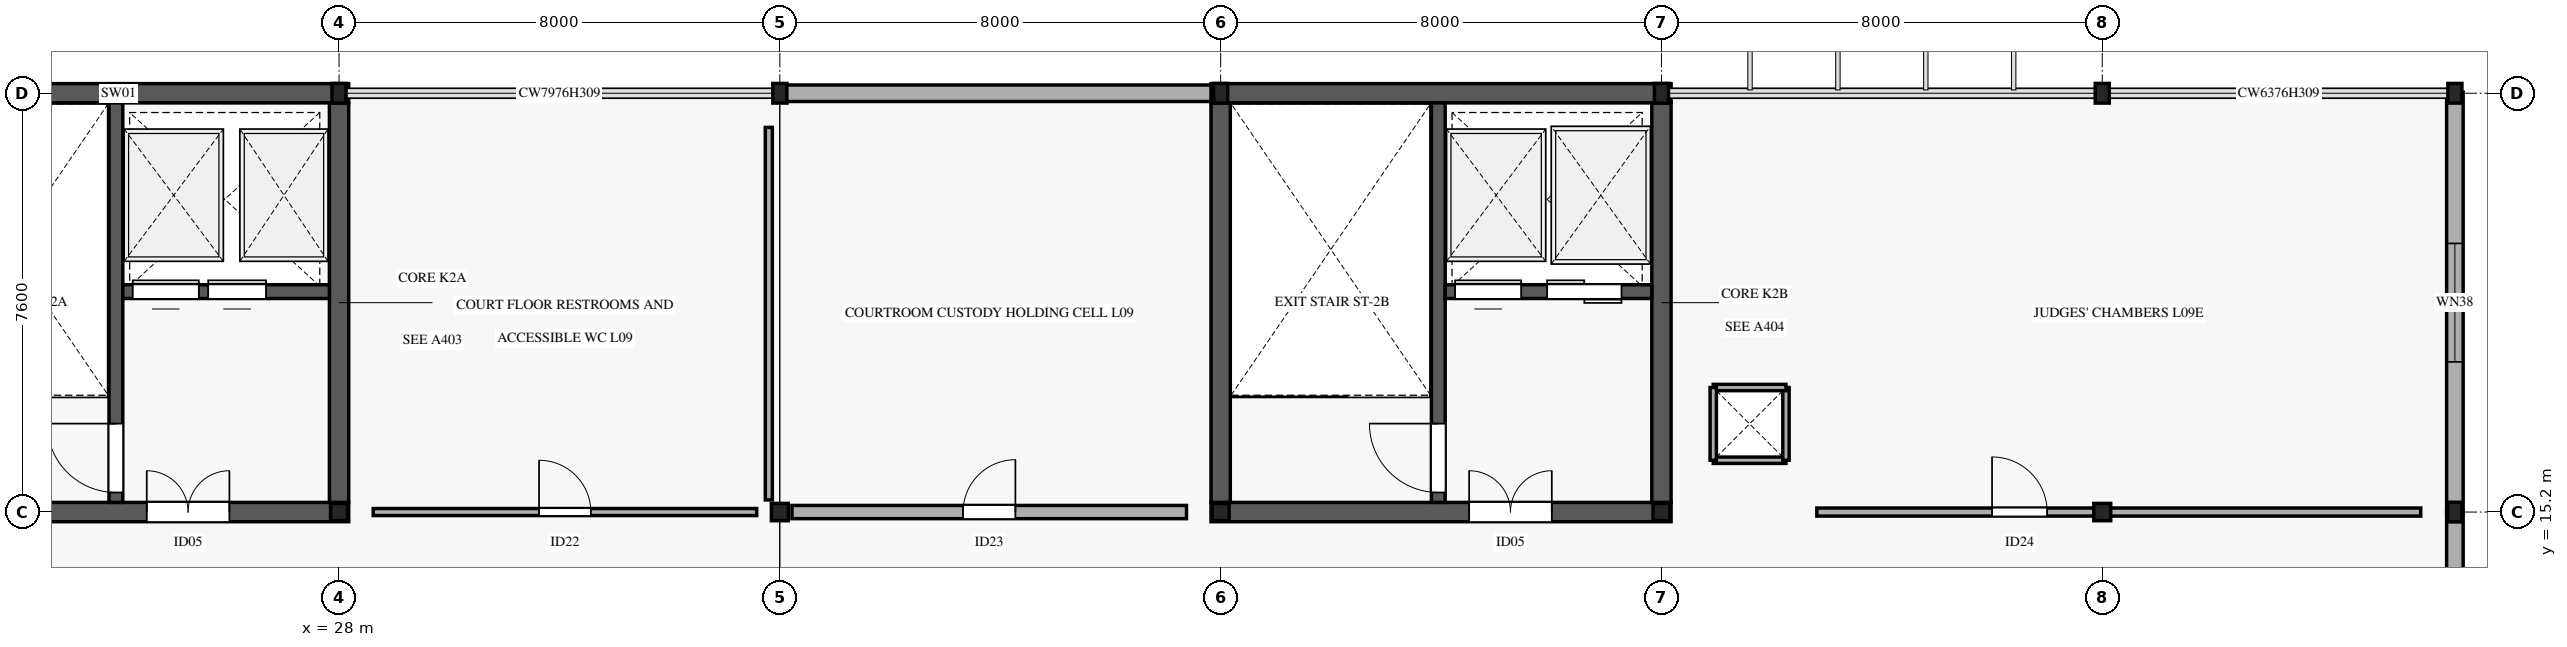
"""IFC4 building model, lengths in metres.
Left out: names, types, materials, properties, quantities, classifications, styles, units other than length and angle.
Written with IfcOpenShell. Run it as: python <this file> out.ifc"""

import sys

from ifc_helpers import new_model, si_unit, direction, frame, frame_2d, origin, origin_2d, place, context, subcontext, project, spatial, rectangle, i_section, extrude, element, fill, save


model = new_model("IFC4")
c1 = context("Model", 3, precision=1e-05, world=origin(), true_north=direction((0.0, 1.0)))
c2 = subcontext(c1, "Body", "Model", "MODEL_VIEW")
j1 = project(units=[si_unit("LENGTHUNIT", "METRE"), si_unit("PLANEANGLEUNIT", "RADIAN")], contexts=[c1])
p1 = place(None, origin())
s1 = spatial("IfcSite", under=j1, at=p1, CompositionType="ELEMENT")
p2 = place(p1, origin())
s2 = spatial("IfcBuilding", under=s1, at=p2, CompositionType="ELEMENT")
p3 = place(p2, frame((0.0, 0.0, 42.0)))
s3 = spatial("IfcBuildingStorey", under=s2, at=p3, CompositionType="ELEMENT", Elevation=42.0)
p4 = place(p3, frame((28.0, 15.2, 0.0), z_axis=(0.0, 0.0, 1.0), x_axis=(1.0, 0.0, 0.0)))
e1 = element("IfcColumn", 1, at=p4, inside=s3, PredefinedType="COLUMN", context=c2, shape_type="SweptSolid", body=[
    extrude(i_section(OverallWidth=0.307, OverallDepth=0.314, WebThickness=0.012, FlangeThickness=0.019, FilletRadius=0.015, at=origin_2d()), origin(), (0.0, 0.0, 1.0), 3.995),
])
p5 = place(p3, frame((28.0, 22.8, 0.0), z_axis=(0.0, 0.0, 1.0), x_axis=(1.0, 0.0, 0.0)))
e2 = element("IfcColumn", 2, at=p5, inside=s3, PredefinedType="COLUMN", context=c2, shape_type="SweptSolid", body=[
    extrude(i_section(OverallWidth=0.255, OverallDepth=0.357, WebThickness=0.01, FlangeThickness=0.018, FilletRadius=0.015, at=origin_2d()), origin(), (0.0, 0.0, 1.0), 3.995),
])
p6 = place(p3, frame((36.0, 15.2, 0.0), z_axis=(0.0, 0.0, 1.0), x_axis=(1.0, 0.0, 0.0)))
e3 = element("IfcColumn", 3, at=p6, inside=s3, PredefinedType="COLUMN", context=c2, shape_type="SweptSolid", body=[
    extrude(i_section(OverallWidth=0.307, OverallDepth=0.314, WebThickness=0.012, FlangeThickness=0.019, FilletRadius=0.015, at=origin_2d()), origin(), (0.0, 0.0, 1.0), 3.995),
])
p7 = place(p3, frame((36.0, 22.8, 0.0), z_axis=(0.0, 0.0, 1.0), x_axis=(1.0, 0.0, 0.0)))
e4 = element("IfcColumn", 4, at=p7, inside=s3, PredefinedType="COLUMN", context=c2, shape_type="SweptSolid", body=[
    extrude(i_section(OverallWidth=0.255, OverallDepth=0.357, WebThickness=0.01, FlangeThickness=0.018, FilletRadius=0.015, at=origin_2d()), origin(), (0.0, 0.0, 1.0), 3.995),
])
p8 = place(p3, frame((44.0, 15.2, 0.0), z_axis=(0.0, 0.0, 1.0), x_axis=(1.0, 0.0, 0.0)))
e5 = element("IfcColumn", 5, at=p8, inside=s3, PredefinedType="COLUMN", context=c2, shape_type="SweptSolid", body=[
    extrude(i_section(OverallWidth=0.307, OverallDepth=0.314, WebThickness=0.012, FlangeThickness=0.019, FilletRadius=0.015, at=origin_2d()), origin(), (0.0, 0.0, 1.0), 3.995),
])
p9 = place(p3, frame((44.0, 22.8, 0.0), z_axis=(0.0, 0.0, 1.0), x_axis=(1.0, 0.0, 0.0)))
e6 = element("IfcColumn", 6, at=p9, inside=s3, PredefinedType="COLUMN", context=c2, shape_type="SweptSolid", body=[
    extrude(i_section(OverallWidth=0.255, OverallDepth=0.357, WebThickness=0.01, FlangeThickness=0.018, FilletRadius=0.015, at=origin_2d()), origin(), (0.0, 0.0, 1.0), 3.995),
])
p10 = place(p3, frame((52.0, 15.2, 0.0), z_axis=(0.0, 0.0, 1.0), x_axis=(1.0, 0.0, 0.0)))
e7 = element("IfcColumn", 7, at=p10, inside=s3, PredefinedType="COLUMN", context=c2, shape_type="SweptSolid", body=[
    extrude(i_section(OverallWidth=0.307, OverallDepth=0.314, WebThickness=0.012, FlangeThickness=0.019, FilletRadius=0.015, at=origin_2d()), origin(), (0.0, 0.0, 1.0), 3.995),
])
p11 = place(p3, frame((52.0, 22.8, 0.0), z_axis=(0.0, 0.0, 1.0), x_axis=(1.0, 0.0, 0.0)))
e8 = element("IfcColumn", 8, at=p11, inside=s3, PredefinedType="COLUMN", context=c2, shape_type="SweptSolid", body=[
    extrude(i_section(OverallWidth=0.255, OverallDepth=0.357, WebThickness=0.01, FlangeThickness=0.018, FilletRadius=0.015, at=origin_2d()), origin(), (0.0, 0.0, 1.0), 3.995),
])
p12 = place(p3, frame((60.0, 15.2, 0.0), z_axis=(0.0, 0.0, 1.0), x_axis=(1.0, 0.0, 0.0)))
e9 = element("IfcColumn", 9, at=p12, inside=s3, PredefinedType="COLUMN", context=c2, shape_type="SweptSolid", body=[
    extrude(i_section(OverallWidth=0.307, OverallDepth=0.314, WebThickness=0.012, FlangeThickness=0.019, FilletRadius=0.015, at=origin_2d()), origin(), (0.0, 0.0, 1.0), 3.995),
])
for number, where, z_axis, x_axis in (
    (10, (60.0, 22.8, 0.0), (0.0, 0.0, 1.0), (1.0, 0.0, 0.0)),
    (11, (66.4, 15.2, 0.0), (0.0, 0.0, 1.0), (1.0, 0.0, 0.0)),
    (12, (66.4, 22.8, 0.0), (0.0, 0.0, 1.0), (1.0, 0.0, 0.0)),
):
    element("IfcColumn", number, at=place(p3, frame(where, z_axis=z_axis, x_axis=x_axis)), inside=s3, PredefinedType="COLUMN", context=c2, shape_type="SweptSolid", body=[
        extrude(i_section(OverallWidth=0.255, OverallDepth=0.357, WebThickness=0.01, FlangeThickness=0.018, FilletRadius=0.015, at=origin_2d()), origin(), (0.0, 0.0, 1.0), 3.995),
    ])
p13 = place(p3, frame((35.98, 22.8, 0.0), z_axis=(0.0, 0.0, 1.0), x_axis=(1.0, 0.0, 0.0)))
e13 = element("IfcWall", 13, at=p13, inside=s3, PredefinedType="STANDARD", context=c2, shape_type="SweptSolid", body=[
    extrude(rectangle(XDim=8.04, YDim=0.3, at=frame_2d((4.02, 0.0))), origin(), (0.0, 0.0, 1.0), 3.06),
])
p14 = place(p3, frame((66.4, 22.82, 0.0), z_axis=(0.0, 0.0, 1.0), x_axis=(0.0, -1.0, 0.0)))
e14 = element("IfcWall", 14, at=p14, inside=s3, PredefinedType="STANDARD", context=c2, shape_type="SweptSolid", body=[
    extrude(rectangle(XDim=7.64, YDim=0.3, at=frame_2d((3.82, 0.0))), origin(), (0.0, 0.0, 1.0), 3.06),
])
p15 = place(p14, frame((2.745, 0.0, 0.75)))
e15 = element("IfcOpeningElement", 15, at=p15, cuts=e14, PredefinedType="OPENING", context=c2, shape_type="SweptSolid", body=[
    extrude(rectangle(XDim=2.15, YDim=1.9, at=frame_2d((1.075, 0.95))), frame((0.0, 0.16, 0.0), z_axis=(0.0, -1.0, 0.0), x_axis=(1.0, 0.0, 0.0)), (0.0, 0.0, 1.0), 0.32),
])
p16 = place(p3, frame((66.4, 15.22, 0.0), z_axis=(0.0, 0.0, 1.0), x_axis=(0.0, -1.0, 0.0)))
e16 = element("IfcWall", 16, at=p16, inside=s3, PredefinedType="STANDARD", context=c2, shape_type="SweptSolid", body=[
    extrude(rectangle(XDim=7.64, YDim=0.3, at=frame_2d((3.82, 0.0))), origin(), (0.0, 0.0, 1.0), 3.06),
])
p17 = place(p16, frame((2.545, 0.0, 0.75)))
e17 = element("IfcOpeningElement", 17, at=p17, cuts=e16, PredefinedType="OPENING", context=c2, shape_type="SweptSolid", body=[
    extrude(rectangle(XDim=2.55, YDim=1.9, at=frame_2d((1.275, 0.95))), frame((0.0, 0.16, 0.0), z_axis=(0.0, -1.0, 0.0), x_axis=(1.0, 0.0, 0.0)), (0.0, 0.0, 1.0), 0.32),
])
for number, where, z_axis, x_axis in (
    (18, (52.94, 16.14, 0.0), (0.0, 0.0, 1.0), (1.0, 0.0, 0.0)),
    (19, (54.26, 16.14, 0.0), (0.0, 0.0, 1.0), (0.0, 1.0, 0.0)),
    (20, (54.26, 17.46, 0.0), (0.0, 0.0, 1.0), (-1.0, 0.0, 0.0)),
    (21, (52.94, 17.46, 0.0), (0.0, 0.0, 1.0), (0.0, -1.0, 0.0)),
):
    element("IfcWall", number, at=place(p3, frame(where, z_axis=z_axis, x_axis=x_axis)), inside=s3, PredefinedType="PARTITIONING", context=c2, shape_type="SweptSolid", body=[
        extrude(rectangle(XDim=1.32, YDim=0.115, at=frame_2d((0.66, 0.0))), origin(), (0.0, 0.0, 1.0), 3.15),
    ])
p18 = place(p3, frame((19.825, 15.2, 0.0), z_axis=(0.0, 0.0, 1.0), x_axis=(1.0, 0.0, 0.0)))
e22 = element("IfcWall", 22, at=p18, inside=s3, PredefinedType="SHEAR", context=c2, shape_type="SweptSolid", body=[
    extrude(rectangle(XDim=8.35, YDim=0.35, at=frame_2d((4.175, 0.0))), origin(), (0.0, 0.0, 1.0), 3.99),
])
p19 = place(p18, frame((4.685, 0.0, 0.0)))
e23 = element("IfcOpeningElement", 23, at=p19, cuts=e22, PredefinedType="OPENING", context=c2, shape_type="SweptSolid", body=[
    extrude(rectangle(XDim=1.5, YDim=2.2, at=frame_2d((0.75, 1.1))), frame((0.0, 0.185, 0.0), z_axis=(0.0, -1.0, 0.0), x_axis=(1.0, 0.0, 0.0)), (0.0, 0.0, 1.0), 0.37),
])
p20 = place(p3, frame((19.825, 22.8, 0.0), z_axis=(0.0, 0.0, 1.0), x_axis=(1.0, 0.0, 0.0)))
e24 = element("IfcWall", 24, at=p20, inside=s3, PredefinedType="SHEAR", context=c2, shape_type="SweptSolid", body=[
    extrude(rectangle(XDim=8.35, YDim=0.35, at=frame_2d((4.175, 0.0))), origin(), (0.0, 0.0, 1.0), 3.99),
])
p21 = place(p3, frame((28.0, 15.375, 0.0), z_axis=(0.0, 0.0, 1.0), x_axis=(0.0, 1.0, 0.0)))
e25 = element("IfcWall", 25, at=p21, inside=s3, PredefinedType="SHEAR", context=c2, shape_type="SweptSolid", body=[
    extrude(rectangle(XDim=7.25, YDim=0.35, at=frame_2d((3.625, 0.0))), origin(), (0.0, 0.0, 1.0), 3.99),
])
p22 = place(p3, frame((23.95, 15.375, 0.0), z_axis=(0.0, 0.0, 1.0), x_axis=(0.0, 1.0, 0.0)))
e26 = element("IfcWall", 26, at=p22, inside=s3, PredefinedType="SHEAR", context=c2, shape_type="SweptSolid", body=[
    extrude(rectangle(XDim=7.25, YDim=0.25, at=frame_2d((3.625, 0.0))), origin(), (0.0, 0.0, 1.0), 3.99),
])
p23 = place(p22, frame((0.18, 0.0, 0.0)))
e27 = element("IfcOpeningElement", 27, at=p23, cuts=e26, PredefinedType="OPENING", context=c2, shape_type="SweptSolid", body=[
    extrude(rectangle(XDim=1.25, YDim=2.2, at=frame_2d((0.625, 1.1))), frame((0.0, 0.135, 0.0), z_axis=(0.0, -1.0, 0.0), x_axis=(1.0, 0.0, 0.0)), (0.0, 0.0, 1.0), 0.27),
])
p24 = place(p3, frame((24.075, 19.2, 0.0), z_axis=(0.0, 0.0, 1.0), x_axis=(1.0, 0.0, 0.0)))
e28 = element("IfcWall", 28, at=p24, inside=s3, PredefinedType="SHEAR", context=c2, shape_type="SweptSolid", body=[
    extrude(rectangle(XDim=3.75, YDim=0.25, at=frame_2d((1.875, 0.0))), origin(), (0.0, 0.0, 1.0), 3.99),
])
p25 = place(p24, frame((0.18, 0.0, 0.0)))
e29 = element("IfcOpeningElement", 29, at=p25, cuts=e28, PredefinedType="OPENING", context=c2, shape_type="SweptSolid", body=[
    extrude(rectangle(XDim=1.2, YDim=2.2, at=frame_2d((0.6, 1.1))), frame((0.0, 0.135, 0.0), z_axis=(0.0, -1.0, 0.0), x_axis=(1.0, 0.0, 0.0)), (0.0, 0.0, 1.0), 0.27),
])
p26 = place(p24, frame((1.55, 0.0, 0.0)))
e30 = element("IfcOpeningElement", 30, at=p26, cuts=e28, PredefinedType="OPENING", context=c2, shape_type="SweptSolid", body=[
    extrude(rectangle(XDim=1.05, YDim=2.2, at=frame_2d((0.525, 1.1))), frame((0.0, 0.135, 0.0), z_axis=(0.0, -1.0, 0.0), x_axis=(1.0, 0.0, 0.0)), (0.0, 0.0, 1.0), 0.27),
])
p27 = place(p3, frame((43.825, 15.2, 0.0), z_axis=(0.0, 0.0, 1.0), x_axis=(1.0, 0.0, 0.0)))
e31 = element("IfcWall", 31, at=p27, inside=s3, PredefinedType="SHEAR", context=c2, shape_type="SweptSolid", body=[
    extrude(rectangle(XDim=8.35, YDim=0.35, at=frame_2d((4.175, 0.0))), origin(), (0.0, 0.0, 1.0), 3.99),
])
p28 = place(p27, frame((4.685, 0.0, 0.0)))
e32 = element("IfcOpeningElement", 32, at=p28, cuts=e31, PredefinedType="OPENING", context=c2, shape_type="SweptSolid", body=[
    extrude(rectangle(XDim=1.5, YDim=2.2, at=frame_2d((0.75, 1.1))), frame((0.0, 0.185, 0.0), z_axis=(0.0, -1.0, 0.0), x_axis=(1.0, 0.0, 0.0)), (0.0, 0.0, 1.0), 0.37),
])
p29 = place(p3, frame((43.825, 22.8, 0.0), z_axis=(0.0, 0.0, 1.0), x_axis=(1.0, 0.0, 0.0)))
e33 = element("IfcWall", 33, at=p29, inside=s3, PredefinedType="SHEAR", context=c2, shape_type="SweptSolid", body=[
    extrude(rectangle(XDim=8.35, YDim=0.35, at=frame_2d((4.175, 0.0))), origin(), (0.0, 0.0, 1.0), 3.99),
])
for number, where, z_axis, x_axis in (
    (34, (44.0, 15.375, 0.0), (0.0, 0.0, 1.0), (0.0, 1.0, 0.0)),
    (35, (52.0, 15.375, 0.0), (0.0, 0.0, 1.0), (0.0, 1.0, 0.0)),
):
    element("IfcWall", number, at=place(p3, frame(where, z_axis=z_axis, x_axis=x_axis)), inside=s3, PredefinedType="SHEAR", context=c2, shape_type="SweptSolid", body=[
        extrude(rectangle(XDim=7.25, YDim=0.35, at=frame_2d((3.625, 0.0))), origin(), (0.0, 0.0, 1.0), 3.99),
    ])
p30 = place(p3, frame((47.95, 15.375, 0.0), z_axis=(0.0, 0.0, 1.0), x_axis=(0.0, 1.0, 0.0)))
e36 = element("IfcWall", 36, at=p30, inside=s3, PredefinedType="SHEAR", context=c2, shape_type="SweptSolid", body=[
    extrude(rectangle(XDim=7.25, YDim=0.25, at=frame_2d((3.625, 0.0))), origin(), (0.0, 0.0, 1.0), 3.99),
])
p31 = place(p30, frame((0.18, 0.0, 0.0)))
e37 = element("IfcOpeningElement", 37, at=p31, cuts=e36, PredefinedType="OPENING", context=c2, shape_type="SweptSolid", body=[
    extrude(rectangle(XDim=1.25, YDim=2.2, at=frame_2d((0.625, 1.1))), frame((0.0, 0.135, 0.0), z_axis=(0.0, -1.0, 0.0), x_axis=(1.0, 0.0, 0.0)), (0.0, 0.0, 1.0), 0.27),
])
p32 = place(p3, frame((48.075, 19.2, 0.0), z_axis=(0.0, 0.0, 1.0), x_axis=(1.0, 0.0, 0.0)))
e38 = element("IfcWall", 38, at=p32, inside=s3, PredefinedType="SHEAR", context=c2, shape_type="SweptSolid", body=[
    extrude(rectangle(XDim=3.75, YDim=0.25, at=frame_2d((1.875, 0.0))), origin(), (0.0, 0.0, 1.0), 3.99),
])
p33 = place(p32, frame((0.18, 0.0, 0.0)))
e39 = element("IfcOpeningElement", 39, at=p33, cuts=e38, PredefinedType="OPENING", context=c2, shape_type="SweptSolid", body=[
    extrude(rectangle(XDim=1.2, YDim=2.2, at=frame_2d((0.6, 1.1))), frame((0.0, 0.135, 0.0), z_axis=(0.0, -1.0, 0.0), x_axis=(1.0, 0.0, 0.0)), (0.0, 0.0, 1.0), 0.27),
])
p34 = place(p32, frame((1.85, 0.0, 0.0)))
e40 = element("IfcOpeningElement", 40, at=p34, cuts=e38, PredefinedType="OPENING", context=c2, shape_type="SweptSolid", body=[
    extrude(rectangle(XDim=1.35, YDim=2.2, at=frame_2d((0.675, 1.1))), frame((0.0, 0.135, 0.0), z_axis=(0.0, -1.0, 0.0), x_axis=(1.0, 0.0, 0.0)), (0.0, 0.0, 1.0), 0.27),
])
p35 = place(p3, frame((28.62, 15.2, 0.0), z_axis=(0.0, 0.0, 1.0), x_axis=(1.0, 0.0, 0.0)))
e41 = element("IfcWall", 41, at=p35, inside=s3, PredefinedType="PARTITIONING", context=c2, shape_type="SweptSolid", body=[
    extrude(rectangle(XDim=6.96, YDim=0.128, at=frame_2d((3.48, 0.0))), origin(), (0.0, 0.0, 1.0), 2.85),
])
p36 = place(p35, frame((3.01, 0.0, 0.0)))
e42 = element("IfcOpeningElement", 42, at=p36, cuts=e41, PredefinedType="OPENING", context=c2, shape_type="SweptSolid", body=[
    extrude(rectangle(XDim=0.94, YDim=2.2, at=frame_2d((0.47, 1.1))), frame((0.0, 0.074, 0.0), z_axis=(0.0, -1.0, 0.0), x_axis=(1.0, 0.0, 0.0)), (0.0, 0.0, 1.0), 0.148),
])
p37 = place(p3, frame((35.8, 15.42, 0.0), z_axis=(0.0, 0.0, 1.0), x_axis=(0.0, 1.0, 0.0)))
e43 = element("IfcWall", 43, at=p37, inside=s3, PredefinedType="PARTITIONING", context=c2, shape_type="SweptSolid", body=[
    extrude(rectangle(XDim=6.76, YDim=0.128, at=frame_2d((3.38, 0.0))), origin(), (0.0, 0.0, 1.0), 2.85),
])
p38 = place(p3, frame((36.22, 15.2, 0.0), z_axis=(0.0, 0.0, 1.0), x_axis=(1.0, 0.0, 0.0)))
e44 = element("IfcWall", 44, at=p38, inside=s3, PredefinedType="PARTITIONING", context=c2, shape_type="SweptSolid", body=[
    extrude(rectangle(XDim=7.16, YDim=0.24, at=frame_2d((3.58, 0.0))), origin(), (0.0, 0.0, 1.0), 2.85),
])
p39 = place(p38, frame((3.105, 0.0, 0.0)))
e45 = element("IfcOpeningElement", 45, at=p39, cuts=e44, PredefinedType="OPENING", context=c2, shape_type="SweptSolid", body=[
    extrude(rectangle(XDim=0.95, YDim=2.15, at=frame_2d((0.475, 1.075))), frame((0.0, 0.13, 0.0), z_axis=(0.0, -1.0, 0.0), x_axis=(1.0, 0.0, 0.0)), (0.0, 0.0, 1.0), 0.26),
])
p40 = place(p3, frame((54.82, 15.2, 0.0), z_axis=(0.0, 0.0, 1.0), x_axis=(1.0, 0.0, 0.0)))
e46 = element("IfcWall", 46, at=p40, inside=s3, PredefinedType="PARTITIONING", context=c2, shape_type="SweptSolid", body=[
    extrude(rectangle(XDim=10.96, YDim=0.146, at=frame_2d((5.48, 0.0))), origin(), (0.0, 0.0, 1.0), 2.85),
])
p41 = place(p40, frame((3.18, 0.0, 0.0)))
e47 = element("IfcOpeningElement", 47, at=p41, cuts=e46, PredefinedType="OPENING", context=c2, shape_type="SweptSolid", body=[
    extrude(rectangle(XDim=1.0, YDim=2.15, at=frame_2d((0.5, 1.075))), frame((0.0, 0.083, 0.0), z_axis=(0.0, -1.0, 0.0), x_axis=(1.0, 0.0, 0.0)), (0.0, 0.0, 1.0), 0.166),
])
p42 = place(p15, origin())
e48 = element("IfcWindow", 48, at=p42, inside=s3, PartitioningType="SINGLE_PANEL", PredefinedType="WINDOW", context=c2, shape_type="SweptSolid", body=[
    extrude(rectangle(XDim=2.15, YDim=1.9, at=frame_2d((1.075, 0.95))), frame((0.0, 0.03, 0.0), z_axis=(0.0, -1.0, 0.0), x_axis=(1.0, 0.0, 0.0)), (0.0, 0.0, 1.0), 0.06),
])
fill(e15, e48)
p43 = place(p23, origin())
e49 = element("IfcDoor", 49, at=p43, inside=s3, OperationType="SINGLE_SWING_RIGHT", PredefinedType="DOOR", context=c2, shape_type="SweptSolid", body=[
    extrude(rectangle(XDim=1.25, YDim=2.2, at=frame_2d((0.625, 1.1))), frame((0.0, 0.025, 0.0), z_axis=(0.0, -1.0, 0.0), x_axis=(1.0, 0.0, 0.0)), (0.0, 0.0, 1.0), 0.05),
])
fill(e27, e49)
p44 = place(p19, origin())
e50 = element("IfcDoor", 50, at=p44, inside=s3, OperationType="DOUBLE_DOOR_SINGLE_SWING", PredefinedType="DOOR", context=c2, shape_type="SweptSolid", body=[
    extrude(rectangle(XDim=1.5, YDim=2.2, at=frame_2d((0.75, 1.1))), frame((0.0, 0.025, 0.0), z_axis=(0.0, -1.0, 0.0), x_axis=(1.0, 0.0, 0.0)), (0.0, 0.0, 1.0), 0.05),
])
fill(e23, e50)
p45 = place(p25, origin())
e51 = element("IfcDoor", 51, at=p45, inside=s3, OperationType="SLIDING_TO_LEFT", PredefinedType="DOOR", context=c2, shape_type="SweptSolid", body=[
    extrude(rectangle(XDim=1.2, YDim=2.2, at=frame_2d((0.6, 1.1))), frame((0.0, 0.025, 0.0), z_axis=(0.0, -1.0, 0.0), x_axis=(1.0, 0.0, 0.0)), (0.0, 0.0, 1.0), 0.05),
])
fill(e29, e51)
p46 = place(p26, origin())
e52 = element("IfcDoor", 52, at=p46, inside=s3, OperationType="SLIDING_TO_RIGHT", PredefinedType="DOOR", context=c2, shape_type="SweptSolid", body=[
    extrude(rectangle(XDim=1.05, YDim=2.2, at=frame_2d((0.525, 1.1))), frame((0.0, 0.025, 0.0), z_axis=(0.0, -1.0, 0.0), x_axis=(1.0, 0.0, 0.0)), (0.0, 0.0, 1.0), 0.05),
])
fill(e30, e52)
p47 = place(p31, origin())
e53 = element("IfcDoor", 53, at=p47, inside=s3, OperationType="SINGLE_SWING_RIGHT", PredefinedType="DOOR", context=c2, shape_type="SweptSolid", body=[
    extrude(rectangle(XDim=1.25, YDim=2.2, at=frame_2d((0.625, 1.1))), frame((0.0, 0.025, 0.0), z_axis=(0.0, -1.0, 0.0), x_axis=(1.0, 0.0, 0.0)), (0.0, 0.0, 1.0), 0.05),
])
fill(e37, e53)
p48 = place(p28, origin())
e54 = element("IfcDoor", 54, at=p48, inside=s3, OperationType="DOUBLE_DOOR_SINGLE_SWING", PredefinedType="DOOR", context=c2, shape_type="SweptSolid", body=[
    extrude(rectangle(XDim=1.5, YDim=2.2, at=frame_2d((0.75, 1.1))), frame((0.0, 0.025, 0.0), z_axis=(0.0, -1.0, 0.0), x_axis=(1.0, 0.0, 0.0)), (0.0, 0.0, 1.0), 0.05),
])
fill(e32, e54)
p49 = place(p33, origin())
e55 = element("IfcDoor", 55, at=p49, inside=s3, OperationType="SLIDING_TO_LEFT", PredefinedType="DOOR", context=c2, shape_type="SweptSolid", body=[
    extrude(rectangle(XDim=1.2, YDim=2.2, at=frame_2d((0.6, 1.1))), frame((0.0, 0.025, 0.0), z_axis=(0.0, -1.0, 0.0), x_axis=(1.0, 0.0, 0.0)), (0.0, 0.0, 1.0), 0.05),
])
fill(e39, e55)
p50 = place(p34, origin())
e56 = element("IfcDoor", 56, at=p50, inside=s3, OperationType="DOUBLE_DOOR_SLIDING", PredefinedType="DOOR", context=c2, shape_type="SweptSolid", body=[
    extrude(rectangle(XDim=1.35, YDim=2.2, at=frame_2d((0.675, 1.1))), frame((0.0, 0.025, 0.0), z_axis=(0.0, -1.0, 0.0), x_axis=(1.0, 0.0, 0.0)), (0.0, 0.0, 1.0), 0.05),
])
fill(e40, e56)
p51 = place(p36, origin())
e57 = element("IfcDoor", 57, at=p51, inside=s3, OperationType="SINGLE_SWING_LEFT", PredefinedType="DOOR", context=c2, shape_type="SweptSolid", body=[
    extrude(rectangle(XDim=0.94, YDim=2.2, at=frame_2d((0.47, 1.1))), frame((0.0, 0.025, 0.0), z_axis=(0.0, -1.0, 0.0), x_axis=(1.0, 0.0, 0.0)), (0.0, 0.0, 1.0), 0.05),
])
fill(e42, e57)
p52 = place(p39, origin())
e58 = element("IfcDoor", 58, at=p52, inside=s3, OperationType="SINGLE_SWING_RIGHT", PredefinedType="DOOR", context=c2, shape_type="SweptSolid", body=[
    extrude(rectangle(XDim=0.95, YDim=2.15, at=frame_2d((0.475, 1.075))), frame((0.0, 0.025, 0.0), z_axis=(0.0, -1.0, 0.0), x_axis=(1.0, 0.0, 0.0)), (0.0, 0.0, 1.0), 0.05),
])
fill(e45, e58)
p53 = place(p41, origin())
e59 = element("IfcDoor", 59, at=p53, inside=s3, OperationType="SINGLE_SWING_LEFT", PredefinedType="DOOR", context=c2, shape_type="SweptSolid", body=[
    extrude(rectangle(XDim=1.0, YDim=2.15, at=frame_2d((0.5, 1.075))), frame((0.0, 0.025, 0.0), z_axis=(0.0, -1.0, 0.0), x_axis=(1.0, 0.0, 0.0)), (0.0, 0.0, 1.0), 0.05),
])
fill(e47, e59)
save(model, sys.argv[1])
